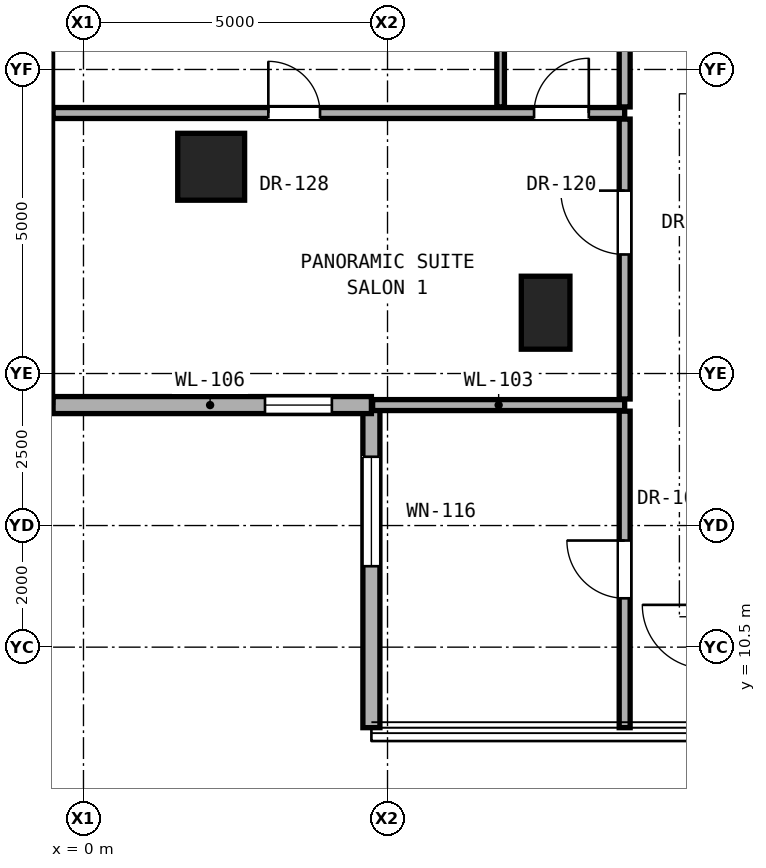
"""IFC4 building model, lengths in metres.
Left out: names, types, materials, properties, quantities, classifications, styles, units other than length and angle.
Written with IfcOpenShell. Run it as: python <this file> out.ifc"""

import sys

from ifc_helpers import new_model, si_unit, direction, frame, frame_2d, origin, origin_2d, place, context, subcontext, project, spatial, rectangle, hollow_rectangle, extrude, element, fill, save


model = new_model("IFC4")
c1 = context("Model", 3, precision=1e-05, world=origin(), true_north=direction((0.0, 1.0)))
c2 = subcontext(c1, "Body", "Model", "MODEL_VIEW")
j1 = project(units=[si_unit("LENGTHUNIT", "METRE"), si_unit("PLANEANGLEUNIT", "RADIAN")], contexts=[c1])
p1 = place(None, origin())
s1 = spatial("IfcSite", under=j1, at=p1, CompositionType="ELEMENT")
p2 = place(p1, origin())
s2 = spatial("IfcBuilding", under=s1, at=p2, CompositionType="ELEMENT")
p3 = place(p2, frame((0.0, 0.0, 98.3)))
s3 = spatial("IfcBuildingStorey", under=s2, at=p3, CompositionType="ELEMENT", Elevation=98.3)
p4 = place(p3, frame((2.1, 18.4, 0.0), z_axis=(0.0, 0.0, 1.0), x_axis=(1.0, 0.0, 0.0)))
e1 = element("IfcColumn", 1, at=p4, inside=s3, PredefinedType="COLUMN", context=c2, shape_type="SweptSolid", body=[
    extrude(hollow_rectangle(XDim=1.1, YDim=1.1, WallThickness=0.06, at=origin_2d()), origin(), (0.0, 0.0, 1.0), 3.3),
])
p5 = place(p3, frame((7.6, 16.0, 0.0), z_axis=(0.0, 0.0, 1.0), x_axis=(1.0, 0.0, 0.0)))
e2 = element("IfcColumn", 2, at=p5, inside=s3, PredefinedType="PILASTER", context=c2, shape_type="SweptSolid", body=[
    extrude(rectangle(XDim=0.8, YDim=1.2, at=origin_2d()), origin(), (0.0, 0.0, 1.0), 3.3),
])
p6 = place(p3, frame((4.735, 14.481, 0.0), z_axis=(0.0, 0.0, 1.0), x_axis=(0.0, -1.0, 0.0)))
e3 = element("IfcWall", 3, at=p6, inside=s3, PredefinedType="SOLIDWALL", context=c2, shape_type="SweptSolid", body=[
    extrude(rectangle(XDim=5.305, YDim=0.28, at=frame_2d((2.652, 0.0))), origin(), (0.0, 0.0, 1.0), 3.06),
])
p7 = place(p6, frame((0.85, 0.0, 0.81)))
e4 = element("IfcOpeningElement", 4, at=p7, cuts=e3, PredefinedType="OPENING", context=c2, shape_type="SweptSolid", body=[
    extrude(rectangle(XDim=1.8, YDim=2.1, at=frame_2d((0.9, 1.05))), frame((0.0, 0.15, 0.0), z_axis=(0.0, -1.0, 0.0), x_axis=(1.0, 0.0, 0.0)), (0.0, 0.0, 1.0), 0.3),
])
p8 = place(p3, frame((-0.57, 14.481, 0.0), z_axis=(0.0, 0.0, 1.0), x_axis=(1.0, 0.0, 0.0)))
e5 = element("IfcWall", 5, at=p8, inside=s3, PredefinedType="SOLIDWALL", context=c2, shape_type="SweptSolid", body=[
    extrude(rectangle(XDim=5.305, YDim=0.28, at=frame_2d((2.653, 0.0))), origin(), (0.0, 0.0, 1.0), 3.06),
])
p9 = place(p8, frame((3.555, 0.0, 0.85)))
e6 = element("IfcOpeningElement", 6, at=p9, cuts=e5, PredefinedType="OPENING", context=c2, shape_type="SweptSolid", body=[
    extrude(rectangle(XDim=1.1, YDim=2.0, at=frame_2d((0.55, 1.0))), frame((0.0, 0.15, 0.0), z_axis=(0.0, -1.0, 0.0), x_axis=(1.0, 0.0, 0.0)), (0.0, 0.0, 1.0), 0.3),
])
p10 = place(p3, frame((4.755, 14.481, 0.0), z_axis=(0.0, 0.0, 1.0), x_axis=(1.0, 0.0, 0.0)))
e7 = element("IfcWall", 7, at=p10, inside=s3, PredefinedType="PARTITIONING", context=c2, shape_type="SweptSolid", body=[
    extrude(rectangle(XDim=4.145, YDim=0.18, at=frame_2d((2.073, 0.0))), origin(), (0.0, 0.0, 1.0), 3.08),
])
p11 = place(p3, frame((-0.57, 19.284, 0.0), z_axis=(0.0, 0.0, 1.0), x_axis=(1.0, 0.0, 0.0)))
e8 = element("IfcWall", 8, at=p11, inside=s3, PredefinedType="PARTITIONING", context=c2, shape_type="SweptSolid", body=[
    extrude(rectangle(XDim=9.47, YDim=0.18, at=frame_2d((4.735, 0.0))), origin(), (0.0, 0.0, 1.0), 2.145),
])
p12 = place(p11, frame((3.61, 0.0, 0.0)))
e9 = element("IfcOpeningElement", 9, at=p12, cuts=e8, PredefinedType="OPENING", context=c2, shape_type="SweptSolid", body=[
    extrude(rectangle(XDim=0.85, YDim=2.01, at=frame_2d((0.425, 1.005))), frame((0.0, 0.1, 0.0), z_axis=(0.0, -1.0, 0.0), x_axis=(1.0, 0.0, 0.0)), (0.0, 0.0, 1.0), 0.2),
])
p13 = place(p11, frame((7.98, 0.0, 0.0)))
e10 = element("IfcOpeningElement", 10, at=p13, cuts=e8, PredefinedType="OPENING", context=c2, shape_type="SweptSolid", body=[
    extrude(rectangle(XDim=0.9, YDim=2.1, at=frame_2d((0.45, 1.05))), frame((0.0, 0.1, 0.0), z_axis=(0.0, -1.0, 0.0), x_axis=(1.0, 0.0, 0.0)), (0.0, 0.0, 1.0), 0.2),
])
p14 = place(p3, frame((6.86, 19.384, 0.0), z_axis=(0.0, 0.0, 1.0), x_axis=(0.0, 1.0, 0.0)))
e11 = element("IfcWall", 11, at=p14, inside=s3, PredefinedType="PARTITIONING", context=c2, shape_type="SweptSolid", body=[
    extrude(rectangle(XDim=2.52, YDim=0.125, at=frame_2d((1.26, 0.0))), origin(), (0.0, 0.0, 1.0), 3.08),
])
p15 = place(p3, frame((8.9, 9.176, 0.0), z_axis=(0.0, 0.0, 1.0), x_axis=(0.0, 1.0, 0.0)))
e12 = element("IfcWall", 12, at=p15, inside=s3, PredefinedType="PARTITIONING", context=c2, shape_type="SweptSolid", body=[
    extrude(rectangle(XDim=5.205, YDim=0.18, at=frame_2d((2.603, 0.0))), origin(), (0.0, 0.0, 1.0), 3.08),
])
p16 = place(p15, frame((2.127, 0.0, 0.0)))
e13 = element("IfcOpeningElement", 13, at=p16, cuts=e12, PredefinedType="OPENING", context=c2, shape_type="SweptSolid", body=[
    extrude(rectangle(XDim=0.95, YDim=2.15, at=frame_2d((0.475, 1.075))), frame((0.0, 0.1, 0.0), z_axis=(0.0, -1.0, 0.0), x_axis=(1.0, 0.0, 0.0)), (0.0, 0.0, 1.0), 0.2),
])
p17 = place(p3, frame((8.9, 14.581, 0.0), z_axis=(0.0, 0.0, 1.0), x_axis=(0.0, 1.0, 0.0)))
e14 = element("IfcWall", 14, at=p17, inside=s3, PredefinedType="PARTITIONING", context=c2, shape_type="SweptSolid", body=[
    extrude(rectangle(XDim=4.603, YDim=0.18, at=frame_2d((2.302, 0.0))), origin(), (0.0, 0.0, 1.0), 2.456),
])
p18 = place(p17, frame((2.376, 0.0, 0.0)))
e15 = element("IfcOpeningElement", 15, at=p18, cuts=e14, PredefinedType="OPENING", context=c2, shape_type="SweptSolid", body=[
    extrude(rectangle(XDim=1.05, YDim=2.2, at=frame_2d((0.525, 1.1))), frame((0.0, 0.1, 0.0), z_axis=(0.0, -1.0, 0.0), x_axis=(1.0, 0.0, 0.0)), (0.0, 0.0, 1.0), 0.2),
])
p19 = place(p3, frame((8.9, 19.384, 0.0), z_axis=(0.0, 0.0, 1.0), x_axis=(0.0, 1.0, 0.0)))
e16 = element("IfcWall", 16, at=p19, inside=s3, PredefinedType="PARTITIONING", context=c2, shape_type="SweptSolid", body=[
    extrude(rectangle(XDim=2.52, YDim=0.18, at=frame_2d((1.26, 0.0))), origin(), (0.0, 0.0, 1.0), 3.08),
])
p20 = place(p7, origin())
e17 = element("IfcWindow", 17, at=p20, inside=s3, PartitioningType="SINGLE_PANEL", PredefinedType="WINDOW", context=c2, shape_type="SweptSolid", body=[
    extrude(rectangle(XDim=1.8, YDim=2.1, at=frame_2d((0.9, 1.05))), frame((0.0, 0.03, 0.0), z_axis=(0.0, -1.0, 0.0), x_axis=(1.0, 0.0, 0.0)), (0.0, 0.0, 1.0), 0.06),
])
fill(e4, e17)
p21 = place(p9, origin())
e18 = element("IfcWindow", 18, at=p21, inside=s3, PartitioningType="SINGLE_PANEL", PredefinedType="WINDOW", context=c2, shape_type="SweptSolid", body=[
    extrude(rectangle(XDim=1.1, YDim=2.0, at=frame_2d((0.55, 1.0))), frame((0.0, 0.03, 0.0), z_axis=(0.0, -1.0, 0.0), x_axis=(1.0, 0.0, 0.0)), (0.0, 0.0, 1.0), 0.06),
])
fill(e6, e18)
p22 = place(p18, origin())
e19 = element("IfcDoor", 19, at=p22, inside=s3, OperationType="SINGLE_SWING_RIGHT", PredefinedType="DOOR", context=c2, shape_type="SweptSolid", body=[
    extrude(rectangle(XDim=1.05, YDim=2.2, at=frame_2d((0.525, 1.1))), frame((0.0, 0.025, 0.0), z_axis=(0.0, -1.0, 0.0), x_axis=(1.0, 0.0, 0.0)), (0.0, 0.0, 1.0), 0.05),
])
fill(e15, e19)
p23 = place(p12, origin())
e20 = element("IfcDoor", 20, at=p23, inside=s3, OperationType="SINGLE_SWING_LEFT", PredefinedType="DOOR", context=c2, shape_type="SweptSolid", body=[
    extrude(rectangle(XDim=0.85, YDim=2.01, at=frame_2d((0.425, 1.005))), frame((0.0, 0.025, 0.0), z_axis=(0.0, -1.0, 0.0), x_axis=(1.0, 0.0, 0.0)), (0.0, 0.0, 1.0), 0.05),
])
fill(e9, e20)
p24 = place(p13, origin())
e21 = element("IfcDoor", 21, at=p24, inside=s3, OperationType="SINGLE_SWING_RIGHT", PredefinedType="DOOR", context=c2, shape_type="SweptSolid", body=[
    extrude(rectangle(XDim=0.9, YDim=2.1, at=frame_2d((0.45, 1.05))), frame((0.0, 0.025, 0.0), z_axis=(0.0, -1.0, 0.0), x_axis=(1.0, 0.0, 0.0)), (0.0, 0.0, 1.0), 0.05),
])
fill(e10, e21)
p25 = place(p16, origin())
e22 = element("IfcDoor", 22, at=p25, inside=s3, OperationType="SINGLE_SWING_RIGHT", PredefinedType="DOOR", context=c2, shape_type="SweptSolid", body=[
    extrude(rectangle(XDim=0.95, YDim=2.15, at=frame_2d((0.475, 1.075))), frame((0.0, 0.025, 0.0), z_axis=(0.0, -1.0, 0.0), x_axis=(1.0, 0.0, 0.0)), (0.0, 0.0, 1.0), 0.05),
])
fill(e13, e22)
save(model, sys.argv[1])
